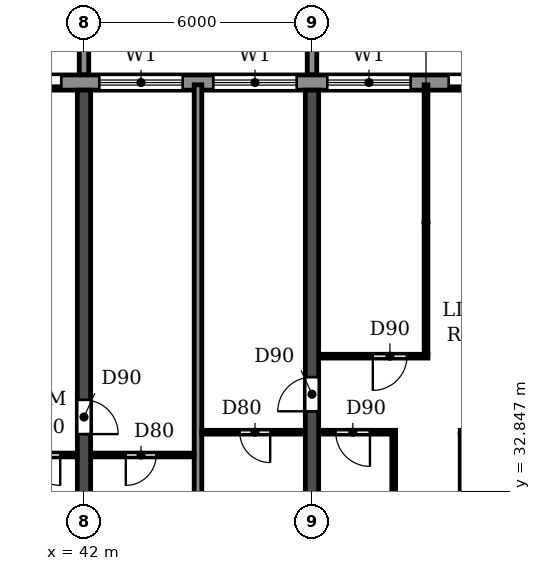
"""IFC4 building model, lengths in metres.
Left out: names, types, materials, properties, quantities, classifications, styles, units other than length and angle.
Written with IfcOpenShell. Run it as: python <this file> out.ifc"""

import sys

from ifc_helpers import new_model, si_unit, direction, frame, frame_2d, origin, place, context, subcontext, project, spatial, polyline, rectangle, outline, extrude, source, transform, mapped, element, fill, save


model = new_model("IFC4")
c1 = context("Model", 3, precision=1e-05, world=origin(), true_north=direction((0.0, 1.0)))
c2 = subcontext(c1, "Body", "Model", "MODEL_VIEW")
j1 = project(units=[si_unit("LENGTHUNIT", "METRE"), si_unit("PLANEANGLEUNIT", "RADIAN")], contexts=[c1])
p1 = place(None, origin())
s1 = spatial("IfcSite", under=j1, at=p1, CompositionType="ELEMENT")
p2 = place(p1, origin())
s2 = spatial("IfcBuilding", under=s1, at=p2, CompositionType="ELEMENT")
p3 = place(p2, frame((0.0, 0.0, 82.8)))
s3 = spatial("IfcBuildingStorey", under=s2, at=p3, CompositionType="ELEMENT", Elevation=82.8)
p4 = place(p3, frame((42.0, 30.525, 0.0), z_axis=(0.0, 0.0, 1.0), x_axis=(0.0, 1.0, 0.0)))
e1 = element("IfcWall", 1, at=p4, inside=s3, PredefinedType="SHEAR", context=c2, shape_type="SweptSolid", body=[
    extrude(rectangle(XDim=12.875, YDim=0.35, at=frame_2d((6.438, 0.0))), origin(), (0.0, 0.0, 1.0), 3.06),
])
p5 = place(p4, frame((3.825, 0.0, 0.0)))
e2 = element("IfcOpeningElement", 2, at=p5, cuts=e1, PredefinedType="OPENING", context=c2, shape_type="SweptSolid", body=[
    extrude(rectangle(XDim=0.9, YDim=2.1, at=frame_2d((0.45, 1.05))), frame((0.0, 0.185, 0.0), z_axis=(0.0, -1.0, 0.0), x_axis=(1.0, 0.0, 0.0)), (0.0, 0.0, 1.0), 0.37),
])
p6 = place(p3, frame((48.0, 30.525, 0.0), z_axis=(0.0, 0.0, 1.0), x_axis=(0.0, 1.0, 0.0)))
e3 = element("IfcWall", 3, at=p6, inside=s3, PredefinedType="SHEAR", context=c2, shape_type="SweptSolid", body=[
    extrude(rectangle(XDim=12.875, YDim=0.35, at=frame_2d((6.438, 0.0))), origin(), (0.0, 0.0, 1.0), 3.06),
])
p7 = place(p6, frame((4.425, 0.0, 0.0)))
e4 = element("IfcOpeningElement", 4, at=p7, cuts=e3, PredefinedType="OPENING", context=c2, shape_type="SweptSolid", body=[
    extrude(rectangle(XDim=0.9, YDim=2.1, at=frame_2d((0.45, 1.05))), frame((0.0, 0.185, 0.0), z_axis=(0.0, -1.0, 0.0), x_axis=(1.0, 0.0, 0.0)), (0.0, 0.0, 1.0), 0.37),
])
p8 = place(p3, frame((91.317, 43.6, 0.0), z_axis=(0.0, 0.0, 1.0), x_axis=(-1.0, 0.0, 0.0)))
e5 = element("IfcWall", 5, at=p8, inside=s3, PredefinedType="STANDARD", context=c2, shape_type="SweptSolid", body=[
    extrude(rectangle(XDim=80.634, YDim=0.4, at=frame_2d((40.317, 0.0))), origin(), (0.0, 0.0, 1.0), 3.06),
])
p9 = place(p8, frame((76.717, 0.0, 0.9)))
e6 = element("IfcOpeningElement", 6, at=p9, cuts=e5, PredefinedType="OPENING", context=c2, shape_type="SweptSolid", body=[
    extrude(rectangle(XDim=2.2, YDim=1.5, at=frame_2d((1.1, 0.75))), frame((0.0, 0.21, 0.0), z_axis=(0.0, -1.0, 0.0), x_axis=(1.0, 0.0, 0.0)), (0.0, 0.0, 1.0), 0.42),
])
p10 = place(p8, frame((73.917, 0.0, 0.0)))
e7 = element("IfcOpeningElement", 7, at=p10, cuts=e5, PredefinedType="OPENING", context=c2, shape_type="SweptSolid", body=[
    extrude(rectangle(XDim=1.8, YDim=2.4, at=frame_2d((0.9, 1.2))), frame((0.0, 0.21, 0.0), z_axis=(0.0, -1.0, 0.0), x_axis=(1.0, 0.0, 0.0)), (0.0, 0.0, 1.0), 0.42),
])
p11 = place(p8, frame((70.717, 0.0, 0.9)))
e8 = element("IfcOpeningElement", 8, at=p11, cuts=e5, PredefinedType="OPENING", context=c2, shape_type="SweptSolid", body=[
    extrude(rectangle(XDim=2.2, YDim=1.5, at=frame_2d((1.1, 0.75))), frame((0.0, 0.21, 0.0), z_axis=(0.0, -1.0, 0.0), x_axis=(1.0, 0.0, 0.0)), (0.0, 0.0, 1.0), 0.42),
])
p12 = place(p8, frame((67.717, 0.0, 0.9)))
e9 = element("IfcOpeningElement", 9, at=p12, cuts=e5, PredefinedType="OPENING", context=c2, shape_type="SweptSolid", body=[
    extrude(rectangle(XDim=2.2, YDim=1.5, at=frame_2d((1.1, 0.75))), frame((0.0, 0.21, 0.0), z_axis=(0.0, -1.0, 0.0), x_axis=(1.0, 0.0, 0.0)), (0.0, 0.0, 1.0), 0.42),
])
p13 = place(p8, frame((64.717, 0.0, 0.9)))
e10 = element("IfcOpeningElement", 10, at=p13, cuts=e5, PredefinedType="OPENING", context=c2, shape_type="SweptSolid", body=[
    extrude(rectangle(XDim=2.2, YDim=1.5, at=frame_2d((1.1, 0.75))), frame((0.0, 0.21, 0.0), z_axis=(0.0, -1.0, 0.0), x_axis=(1.0, 0.0, 0.0)), (0.0, 0.0, 1.0), 0.42),
])
p14 = place(p8, frame((61.917, 0.0, 0.0)))
e11 = element("IfcOpeningElement", 11, at=p14, cuts=e5, PredefinedType="OPENING", context=c2, shape_type="SweptSolid", body=[
    extrude(rectangle(XDim=1.8, YDim=2.4, at=frame_2d((0.9, 1.2))), frame((0.0, 0.21, 0.0), z_axis=(0.0, -1.0, 0.0), x_axis=(1.0, 0.0, 0.0)), (0.0, 0.0, 1.0), 0.42),
])
p15 = place(p8, frame((58.917, 0.0, 0.0)))
e12 = element("IfcOpeningElement", 12, at=p15, cuts=e5, PredefinedType="OPENING", context=c2, shape_type="SweptSolid", body=[
    extrude(rectangle(XDim=1.8, YDim=2.4, at=frame_2d((0.9, 1.2))), frame((0.0, 0.21, 0.0), z_axis=(0.0, -1.0, 0.0), x_axis=(1.0, 0.0, 0.0)), (0.0, 0.0, 1.0), 0.42),
])
p16 = place(p8, frame((55.717, 0.0, 0.9)))
e13 = element("IfcOpeningElement", 13, at=p16, cuts=e5, PredefinedType="OPENING", context=c2, shape_type="SweptSolid", body=[
    extrude(rectangle(XDim=2.2, YDim=1.5, at=frame_2d((1.1, 0.75))), frame((0.0, 0.21, 0.0), z_axis=(0.0, -1.0, 0.0), x_axis=(1.0, 0.0, 0.0)), (0.0, 0.0, 1.0), 0.42),
])
p17 = place(p8, frame((52.717, 0.0, 0.9)))
e14 = element("IfcOpeningElement", 14, at=p17, cuts=e5, PredefinedType="OPENING", context=c2, shape_type="SweptSolid", body=[
    extrude(rectangle(XDim=2.2, YDim=1.5, at=frame_2d((1.1, 0.75))), frame((0.0, 0.21, 0.0), z_axis=(0.0, -1.0, 0.0), x_axis=(1.0, 0.0, 0.0)), (0.0, 0.0, 1.0), 0.42),
])
p18 = place(p8, frame((49.917, 0.0, 0.0)))
e15 = element("IfcOpeningElement", 15, at=p18, cuts=e5, PredefinedType="OPENING", context=c2, shape_type="SweptSolid", body=[
    extrude(rectangle(XDim=1.8, YDim=2.4, at=frame_2d((0.9, 1.2))), frame((0.0, 0.21, 0.0), z_axis=(0.0, -1.0, 0.0), x_axis=(1.0, 0.0, 0.0)), (0.0, 0.0, 1.0), 0.42),
])
p19 = place(p8, frame((46.717, 0.0, 0.9)))
e16 = element("IfcOpeningElement", 16, at=p19, cuts=e5, PredefinedType="OPENING", context=c2, shape_type="SweptSolid", body=[
    extrude(rectangle(XDim=2.2, YDim=1.5, at=frame_2d((1.1, 0.75))), frame((0.0, 0.21, 0.0), z_axis=(0.0, -1.0, 0.0), x_axis=(1.0, 0.0, 0.0)), (0.0, 0.0, 1.0), 0.42),
])
p20 = place(p8, frame((43.717, 0.0, 0.9)))
e17 = element("IfcOpeningElement", 17, at=p20, cuts=e5, PredefinedType="OPENING", context=c2, shape_type="SweptSolid", body=[
    extrude(rectangle(XDim=2.2, YDim=1.5, at=frame_2d((1.1, 0.75))), frame((0.0, 0.21, 0.0), z_axis=(0.0, -1.0, 0.0), x_axis=(1.0, 0.0, 0.0)), (0.0, 0.0, 1.0), 0.42),
])
p21 = place(p8, frame((40.717, 0.0, 0.9)))
e18 = element("IfcOpeningElement", 18, at=p21, cuts=e5, PredefinedType="OPENING", context=c2, shape_type="SweptSolid", body=[
    extrude(rectangle(XDim=2.2, YDim=1.5, at=frame_2d((1.1, 0.75))), frame((0.0, 0.21, 0.0), z_axis=(0.0, -1.0, 0.0), x_axis=(1.0, 0.0, 0.0)), (0.0, 0.0, 1.0), 0.42),
])
p22 = place(p8, frame((37.917, 0.0, 0.0)))
e19 = element("IfcOpeningElement", 19, at=p22, cuts=e5, PredefinedType="OPENING", context=c2, shape_type="SweptSolid", body=[
    extrude(rectangle(XDim=1.8, YDim=2.4, at=frame_2d((0.9, 1.2))), frame((0.0, 0.21, 0.0), z_axis=(0.0, -1.0, 0.0), x_axis=(1.0, 0.0, 0.0)), (0.0, 0.0, 1.0), 0.42),
])
p23 = place(p8, frame((34.717, 0.0, 0.9)))
e20 = element("IfcOpeningElement", 20, at=p23, cuts=e5, PredefinedType="OPENING", context=c2, shape_type="SweptSolid", body=[
    extrude(rectangle(XDim=2.2, YDim=1.5, at=frame_2d((1.1, 0.75))), frame((0.0, 0.21, 0.0), z_axis=(0.0, -1.0, 0.0), x_axis=(1.0, 0.0, 0.0)), (0.0, 0.0, 1.0), 0.42),
])
p24 = place(p8, frame((31.717, 0.0, 0.9)))
e21 = element("IfcOpeningElement", 21, at=p24, cuts=e5, PredefinedType="OPENING", context=c2, shape_type="SweptSolid", body=[
    extrude(rectangle(XDim=2.2, YDim=1.5, at=frame_2d((1.1, 0.75))), frame((0.0, 0.21, 0.0), z_axis=(0.0, -1.0, 0.0), x_axis=(1.0, 0.0, 0.0)), (0.0, 0.0, 1.0), 0.42),
])
p25 = place(p8, frame((28.917, 0.0, 0.0)))
e22 = element("IfcOpeningElement", 22, at=p25, cuts=e5, PredefinedType="OPENING", context=c2, shape_type="SweptSolid", body=[
    extrude(rectangle(XDim=1.8, YDim=2.4, at=frame_2d((0.9, 1.2))), frame((0.0, 0.21, 0.0), z_axis=(0.0, -1.0, 0.0), x_axis=(1.0, 0.0, 0.0)), (0.0, 0.0, 1.0), 0.42),
])
p26 = place(p8, frame((25.717, 0.0, 0.9)))
e23 = element("IfcOpeningElement", 23, at=p26, cuts=e5, PredefinedType="OPENING", context=c2, shape_type="SweptSolid", body=[
    extrude(rectangle(XDim=2.2, YDim=1.5, at=frame_2d((1.1, 0.75))), frame((0.0, 0.21, 0.0), z_axis=(0.0, -1.0, 0.0), x_axis=(1.0, 0.0, 0.0)), (0.0, 0.0, 1.0), 0.42),
])
p27 = place(p8, frame((22.717, 0.0, 0.9)))
e24 = element("IfcOpeningElement", 24, at=p27, cuts=e5, PredefinedType="OPENING", context=c2, shape_type="SweptSolid", body=[
    extrude(rectangle(XDim=2.2, YDim=1.5, at=frame_2d((1.1, 0.75))), frame((0.0, 0.21, 0.0), z_axis=(0.0, -1.0, 0.0), x_axis=(1.0, 0.0, 0.0)), (0.0, 0.0, 1.0), 0.42),
])
p28 = place(p8, frame((19.717, 0.0, 0.9)))
e25 = element("IfcOpeningElement", 25, at=p28, cuts=e5, PredefinedType="OPENING", context=c2, shape_type="SweptSolid", body=[
    extrude(rectangle(XDim=2.2, YDim=1.5, at=frame_2d((1.1, 0.75))), frame((0.0, 0.21, 0.0), z_axis=(0.0, -1.0, 0.0), x_axis=(1.0, 0.0, 0.0)), (0.0, 0.0, 1.0), 0.42),
])
p29 = place(p8, frame((16.717, 0.0, 0.9)))
e26 = element("IfcOpeningElement", 26, at=p29, cuts=e5, PredefinedType="OPENING", context=c2, shape_type="SweptSolid", body=[
    extrude(rectangle(XDim=2.2, YDim=1.5, at=frame_2d((1.1, 0.75))), frame((0.0, 0.21, 0.0), z_axis=(0.0, -1.0, 0.0), x_axis=(1.0, 0.0, 0.0)), (0.0, 0.0, 1.0), 0.42),
])
p30 = place(p8, frame((13.917, 0.0, 0.0)))
e27 = element("IfcOpeningElement", 27, at=p30, cuts=e5, PredefinedType="OPENING", context=c2, shape_type="SweptSolid", body=[
    extrude(rectangle(XDim=1.8, YDim=2.4, at=frame_2d((0.9, 1.2))), frame((0.0, 0.21, 0.0), z_axis=(0.0, -1.0, 0.0), x_axis=(1.0, 0.0, 0.0)), (0.0, 0.0, 1.0), 0.42),
])
p31 = place(p8, frame((10.717, 0.0, 0.9)))
e28 = element("IfcOpeningElement", 28, at=p31, cuts=e5, PredefinedType="OPENING", context=c2, shape_type="SweptSolid", body=[
    extrude(rectangle(XDim=2.2, YDim=1.5, at=frame_2d((1.1, 0.75))), frame((0.0, 0.21, 0.0), z_axis=(0.0, -1.0, 0.0), x_axis=(1.0, 0.0, 0.0)), (0.0, 0.0, 1.0), 0.42),
])
p32 = place(p8, frame((7.717, 0.0, 0.9)))
e29 = element("IfcOpeningElement", 29, at=p32, cuts=e5, PredefinedType="OPENING", context=c2, shape_type="SweptSolid", body=[
    extrude(rectangle(XDim=2.2, YDim=1.5, at=frame_2d((1.1, 0.75))), frame((0.0, 0.21, 0.0), z_axis=(0.0, -1.0, 0.0), x_axis=(1.0, 0.0, 0.0)), (0.0, 0.0, 1.0), 0.42),
])
p33 = place(p8, frame((4.917, 0.0, 0.0)))
e30 = element("IfcOpeningElement", 30, at=p33, cuts=e5, PredefinedType="OPENING", context=c2, shape_type="SweptSolid", body=[
    extrude(rectangle(XDim=1.8, YDim=2.4, at=frame_2d((0.9, 1.2))), frame((0.0, 0.21, 0.0), z_axis=(0.0, -1.0, 0.0), x_axis=(1.0, 0.0, 0.0)), (0.0, 0.0, 1.0), 0.42),
])
p34 = place(p8, frame((1.717, 0.0, 0.9)))
e31 = element("IfcOpeningElement", 31, at=p34, cuts=e5, PredefinedType="OPENING", context=c2, shape_type="SweptSolid", body=[
    extrude(rectangle(XDim=2.2, YDim=1.5, at=frame_2d((1.1, 0.75))), frame((0.0, 0.21, 0.0), z_axis=(0.0, -1.0, 0.0), x_axis=(1.0, 0.0, 0.0)), (0.0, 0.0, 1.0), 0.42),
])
m1 = source(origin(), c2, "Body", "SweptSolid", [
    extrude(outline(polyline([(0.0, 0.0), (0.25, 0.0), (0.25, 3.1), (0.0, 3.1), (0.0, 0.0)])), origin(), (0.0, 0.0, 1.0), 3.1),
])
for number, where in (
    (32, (41.875, 43.8, 0.0)),
    (33, (47.875, 43.8, 0.0)),
):
    element("IfcWall", number, at=place(p3, frame(where)), inside=s3, PredefinedType="STANDARD", context=c2, shape_type="MappedRepresentation", body=[
        mapped(m1, transform((0.0, 0.0, 0.0))),
    ])
p35 = place(p3, frame((45.0, 30.535, 0.0), z_axis=(0.0, 0.0, 1.0), x_axis=(0.0, 1.0, 0.0)))
e34 = element("IfcWall", 34, at=p35, inside=s3, PredefinedType="PARTITIONING", context=c2, shape_type="SweptSolid", body=[
    extrude(rectangle(XDim=13.005, YDim=0.2, at=frame_2d((6.502, 0.0))), origin(), (0.0, 0.0, 1.0), 3.06),
])
p36 = place(p3, frame((39.9, 33.8, 0.0), z_axis=(0.0, 0.0, 1.0), x_axis=(1.0, 0.0, 0.0)))
e35 = element("IfcWall", 35, at=p36, inside=s3, PredefinedType="PARTITIONING", context=c2, shape_type="SweptSolid", body=[
    extrude(rectangle(XDim=1.915, YDim=0.1, at=frame_2d((0.958, 0.0))), origin(), (0.0, 0.0, 1.0), 3.06),
])
p37 = place(p36, frame((0.675, 0.0, 0.0)))
e36 = element("IfcOpeningElement", 36, at=p37, cuts=e35, PredefinedType="OPENING", context=c2, shape_type="SweptSolid", body=[
    extrude(rectangle(XDim=0.8, YDim=2.1, at=frame_2d((0.4, 1.05))), frame((0.0, 0.06, 0.0), z_axis=(0.0, -1.0, 0.0), x_axis=(1.0, 0.0, 0.0)), (0.0, 0.0, 1.0), 0.12),
])
p38 = place(p3, frame((42.185, 33.8, 0.0), z_axis=(0.0, 0.0, 1.0), x_axis=(1.0, 0.0, 0.0)))
e37 = element("IfcWall", 37, at=p38, inside=s3, PredefinedType="PARTITIONING", context=c2, shape_type="SweptSolid", body=[
    extrude(rectangle(XDim=2.715, YDim=0.1, at=frame_2d((1.357, 0.0))), origin(), (0.0, 0.0, 1.0), 3.06),
])
p39 = place(p38, frame((0.915, 0.0, 0.0)))
e38 = element("IfcOpeningElement", 38, at=p39, cuts=e37, PredefinedType="OPENING", context=c2, shape_type="SweptSolid", body=[
    extrude(rectangle(XDim=0.8, YDim=2.1, at=frame_2d((0.4, 1.05))), frame((0.0, 0.06, 0.0), z_axis=(0.0, -1.0, 0.0), x_axis=(1.0, 0.0, 0.0)), (0.0, 0.0, 1.0), 0.12),
])
p40 = place(p3, frame((45.1, 34.4, 0.0), z_axis=(0.0, 0.0, 1.0), x_axis=(1.0, 0.0, 0.0)))
e39 = element("IfcWall", 39, at=p40, inside=s3, PredefinedType="PARTITIONING", context=c2, shape_type="SweptSolid", body=[
    extrude(rectangle(XDim=2.715, YDim=0.1, at=frame_2d((1.357, 0.0))), origin(), (0.0, 0.0, 1.0), 3.06),
])
p41 = place(p40, frame((1.0, 0.0, 0.0)))
e40 = element("IfcOpeningElement", 40, at=p41, cuts=e39, PredefinedType="OPENING", context=c2, shape_type="SweptSolid", body=[
    extrude(rectangle(XDim=0.8, YDim=2.1, at=frame_2d((0.4, 1.05))), frame((0.0, 0.06, 0.0), z_axis=(0.0, -1.0, 0.0), x_axis=(1.0, 0.0, 0.0)), (0.0, 0.0, 1.0), 0.12),
])
p42 = place(p3, frame((48.185, 34.4, 0.0), z_axis=(0.0, 0.0, 1.0), x_axis=(1.0, 0.0, 0.0)))
e41 = element("IfcWall", 41, at=p42, inside=s3, PredefinedType="PARTITIONING", context=c2, shape_type="SweptSolid", body=[
    extrude(rectangle(XDim=2.015, YDim=0.1, at=frame_2d((1.007, 0.0))), origin(), (0.0, 0.0, 1.0), 3.06),
])
p43 = place(p42, frame((0.44, 0.0, 0.0)))
e42 = element("IfcOpeningElement", 42, at=p43, cuts=e41, PredefinedType="OPENING", context=c2, shape_type="SweptSolid", body=[
    extrude(rectangle(XDim=0.9, YDim=2.1, at=frame_2d((0.45, 1.05))), frame((0.0, 0.06, 0.0), z_axis=(0.0, -1.0, 0.0), x_axis=(1.0, 0.0, 0.0)), (0.0, 0.0, 1.0), 0.12),
])
p44 = place(p3, frame((51.9, 34.4, 0.0), z_axis=(0.0, 0.0, 1.0), x_axis=(1.0, 0.0, 0.0)))
e43 = element("IfcWall", 43, at=p44, inside=s3, PredefinedType="PARTITIONING", context=c2, shape_type="SweptSolid", body=[
    extrude(rectangle(XDim=1.915, YDim=0.1, at=frame_2d((0.958, 0.0))), origin(), (0.0, 0.0, 1.0), 3.06),
])
p45 = place(p44, frame((0.675, 0.0, 0.0)))
e44 = element("IfcOpeningElement", 44, at=p45, cuts=e43, PredefinedType="OPENING", context=c2, shape_type="SweptSolid", body=[
    extrude(rectangle(XDim=0.8, YDim=2.1, at=frame_2d((0.4, 1.05))), frame((0.0, 0.06, 0.0), z_axis=(0.0, -1.0, 0.0), x_axis=(1.0, 0.0, 0.0)), (0.0, 0.0, 1.0), 0.12),
])
p46 = place(p3, frame((48.185, 36.4, 0.0), z_axis=(0.0, 0.0, 1.0), x_axis=(1.0, 0.0, 0.0)))
e45 = element("IfcWall", 45, at=p46, inside=s3, PredefinedType="PARTITIONING", context=c2, shape_type="SweptSolid", body=[
    extrude(rectangle(XDim=2.865, YDim=0.1, at=frame_2d((1.433, 0.0))), origin(), (0.0, 0.0, 1.0), 3.06),
])
p47 = place(p46, frame((1.415, 0.0, 0.0)))
e46 = element("IfcOpeningElement", 46, at=p47, cuts=e45, PredefinedType="OPENING", context=c2, shape_type="SweptSolid", body=[
    extrude(rectangle(XDim=0.9, YDim=2.1, at=frame_2d((0.45, 1.05))), frame((0.0, 0.06, 0.0), z_axis=(0.0, -1.0, 0.0), x_axis=(1.0, 0.0, 0.0)), (0.0, 0.0, 1.0), 0.12),
])
p48 = place(p3, frame((50.15, 30.535, 0.0), z_axis=(0.0, 0.0, 1.0), x_axis=(0.0, 1.0, 0.0)))
e47 = element("IfcWall", 47, at=p48, inside=s3, PredefinedType="PARTITIONING", context=c2, shape_type="SweptSolid", body=[
    extrude(rectangle(XDim=3.815, YDim=0.1, at=frame_2d((1.908, 0.0))), origin(), (0.0, 0.0, 1.0), 3.06),
])
p49 = place(p3, frame((51.0, 36.45, 0.0), z_axis=(0.0, 0.0, 1.0), x_axis=(0.0, 1.0, 0.0)))
e48 = element("IfcWall", 48, at=p49, inside=s3, PredefinedType="PARTITIONING", context=c2, shape_type="SweptSolid", body=[
    extrude(rectangle(XDim=7.09, YDim=0.1, at=frame_2d((3.545, 0.0))), origin(), (0.0, 0.0, 1.0), 3.06),
])
p50 = place(p3, frame((51.95, 30.535, 0.0), z_axis=(0.0, 0.0, 1.0), x_axis=(0.0, 1.0, 0.0)))
e49 = element("IfcWall", 49, at=p50, inside=s3, PredefinedType="PARTITIONING", context=c2, shape_type="SweptSolid", body=[
    extrude(rectangle(XDim=3.815, YDim=0.1, at=frame_2d((1.908, 0.0))), origin(), (0.0, 0.0, 1.0), 3.06),
])
p51 = place(p18, origin())
e50 = element("IfcDoor", 50, at=p51, inside=s3, OperationType="DOUBLE_DOOR_SLIDING", PredefinedType="DOOR", context=c2, shape_type="SweptSolid", body=[
    extrude(rectangle(XDim=1.8, YDim=2.4, at=frame_2d((0.9, 1.2))), frame((0.0, 0.025, 0.0), z_axis=(0.0, -1.0, 0.0), x_axis=(1.0, 0.0, 0.0)), (0.0, 0.0, 1.0), 0.05),
])
fill(e15, e50)
p52 = place(p19, origin())
e51 = element("IfcWindow", 51, at=p52, inside=s3, PartitioningType="DOUBLE_PANEL_HORIZONTAL", PredefinedType="WINDOW", context=c2, shape_type="SweptSolid", body=[
    extrude(rectangle(XDim=2.2, YDim=1.5, at=frame_2d((1.1, 0.75))), frame((0.0, 0.03, 0.0), z_axis=(0.0, -1.0, 0.0), x_axis=(1.0, 0.0, 0.0)), (0.0, 0.0, 1.0), 0.06),
])
fill(e16, e51)
p53 = place(p20, origin())
e52 = element("IfcWindow", 52, at=p53, inside=s3, PartitioningType="DOUBLE_PANEL_HORIZONTAL", PredefinedType="WINDOW", context=c2, shape_type="SweptSolid", body=[
    extrude(rectangle(XDim=2.2, YDim=1.5, at=frame_2d((1.1, 0.75))), frame((0.0, 0.03, 0.0), z_axis=(0.0, -1.0, 0.0), x_axis=(1.0, 0.0, 0.0)), (0.0, 0.0, 1.0), 0.06),
])
fill(e17, e52)
p54 = place(p21, origin())
e53 = element("IfcWindow", 53, at=p54, inside=s3, PartitioningType="DOUBLE_PANEL_HORIZONTAL", PredefinedType="WINDOW", context=c2, shape_type="SweptSolid", body=[
    extrude(rectangle(XDim=2.2, YDim=1.5, at=frame_2d((1.1, 0.75))), frame((0.0, 0.03, 0.0), z_axis=(0.0, -1.0, 0.0), x_axis=(1.0, 0.0, 0.0)), (0.0, 0.0, 1.0), 0.06),
])
fill(e18, e53)
p55 = place(p22, origin())
e54 = element("IfcDoor", 54, at=p55, inside=s3, OperationType="DOUBLE_DOOR_SLIDING", PredefinedType="DOOR", context=c2, shape_type="SweptSolid", body=[
    extrude(rectangle(XDim=1.8, YDim=2.4, at=frame_2d((0.9, 1.2))), frame((0.0, 0.025, 0.0), z_axis=(0.0, -1.0, 0.0), x_axis=(1.0, 0.0, 0.0)), (0.0, 0.0, 1.0), 0.05),
])
fill(e19, e54)
p56 = place(p39, frame((0.8, 0.0, 0.0), z_axis=(0.0, 0.0, 1.0), x_axis=(-1.0, 0.0, 0.0)))
e55 = element("IfcDoor", 55, at=p56, inside=s3, OperationType="SINGLE_SWING_RIGHT", PredefinedType="DOOR", context=c2, shape_type="SweptSolid", body=[
    extrude(rectangle(XDim=0.8, YDim=2.1, at=frame_2d((0.4, 1.05))), frame((0.0, 0.025, 0.0), z_axis=(0.0, -1.0, 0.0), x_axis=(1.0, 0.0, 0.0)), (0.0, 0.0, 1.0), 0.05),
])
fill(e38, e55)
p57 = place(p37, frame((0.8, 0.0, 0.0), z_axis=(0.0, 0.0, 1.0), x_axis=(-1.0, 0.0, 0.0)))
e56 = element("IfcDoor", 56, at=p57, inside=s3, OperationType="SINGLE_SWING_LEFT", PredefinedType="DOOR", context=c2, shape_type="SweptSolid", body=[
    extrude(rectangle(XDim=0.8, YDim=2.1, at=frame_2d((0.4, 1.05))), frame((0.0, 0.025, 0.0), z_axis=(0.0, -1.0, 0.0), x_axis=(1.0, 0.0, 0.0)), (0.0, 0.0, 1.0), 0.05),
])
fill(e36, e56)
p58 = place(p5, frame((0.9, 0.0, 0.0), z_axis=(0.0, 0.0, 1.0), x_axis=(-1.0, 0.0, 0.0)))
e57 = element("IfcDoor", 57, at=p58, inside=s3, OperationType="SINGLE_SWING_RIGHT", PredefinedType="DOOR", context=c2, shape_type="SweptSolid", body=[
    extrude(rectangle(XDim=0.9, YDim=2.1, at=frame_2d((0.45, 1.05))), frame((0.0, 0.025, 0.0), z_axis=(0.0, -1.0, 0.0), x_axis=(1.0, 0.0, 0.0)), (0.0, 0.0, 1.0), 0.05),
])
fill(e2, e57)
p59 = place(p41, frame((0.8, 0.0, 0.0), z_axis=(0.0, 0.0, 1.0), x_axis=(-1.0, 0.0, 0.0)))
e58 = element("IfcDoor", 58, at=p59, inside=s3, OperationType="SINGLE_SWING_LEFT", PredefinedType="DOOR", context=c2, shape_type="SweptSolid", body=[
    extrude(rectangle(XDim=0.8, YDim=2.1, at=frame_2d((0.4, 1.05))), frame((0.0, 0.025, 0.0), z_axis=(0.0, -1.0, 0.0), x_axis=(1.0, 0.0, 0.0)), (0.0, 0.0, 1.0), 0.05),
])
fill(e40, e58)
p60 = place(p7, origin())
e59 = element("IfcDoor", 59, at=p60, inside=s3, OperationType="SINGLE_SWING_LEFT", PredefinedType="DOOR", context=c2, shape_type="SweptSolid", body=[
    extrude(rectangle(XDim=0.9, YDim=2.1, at=frame_2d((0.45, 1.05))), frame((0.0, 0.025, 0.0), z_axis=(0.0, -1.0, 0.0), x_axis=(1.0, 0.0, 0.0)), (0.0, 0.0, 1.0), 0.05),
])
fill(e4, e59)
p61 = place(p43, frame((0.9, 0.0, 0.0), z_axis=(0.0, 0.0, 1.0), x_axis=(-1.0, 0.0, 0.0)))
e60 = element("IfcDoor", 60, at=p61, inside=s3, OperationType="SINGLE_SWING_LEFT", PredefinedType="DOOR", context=c2, shape_type="SweptSolid", body=[
    extrude(rectangle(XDim=0.9, YDim=2.1, at=frame_2d((0.45, 1.05))), frame((0.0, 0.025, 0.0), z_axis=(0.0, -1.0, 0.0), x_axis=(1.0, 0.0, 0.0)), (0.0, 0.0, 1.0), 0.05),
])
fill(e42, e60)
p62 = place(p47, frame((0.9, 0.0, 0.0), z_axis=(0.0, 0.0, 1.0), x_axis=(-1.0, 0.0, 0.0)))
e61 = element("IfcDoor", 61, at=p62, inside=s3, OperationType="SINGLE_SWING_RIGHT", PredefinedType="DOOR", context=c2, shape_type="SweptSolid", body=[
    extrude(rectangle(XDim=0.9, YDim=2.1, at=frame_2d((0.45, 1.05))), frame((0.0, 0.025, 0.0), z_axis=(0.0, -1.0, 0.0), x_axis=(1.0, 0.0, 0.0)), (0.0, 0.0, 1.0), 0.05),
])
fill(e46, e61)
save(model, sys.argv[1])
